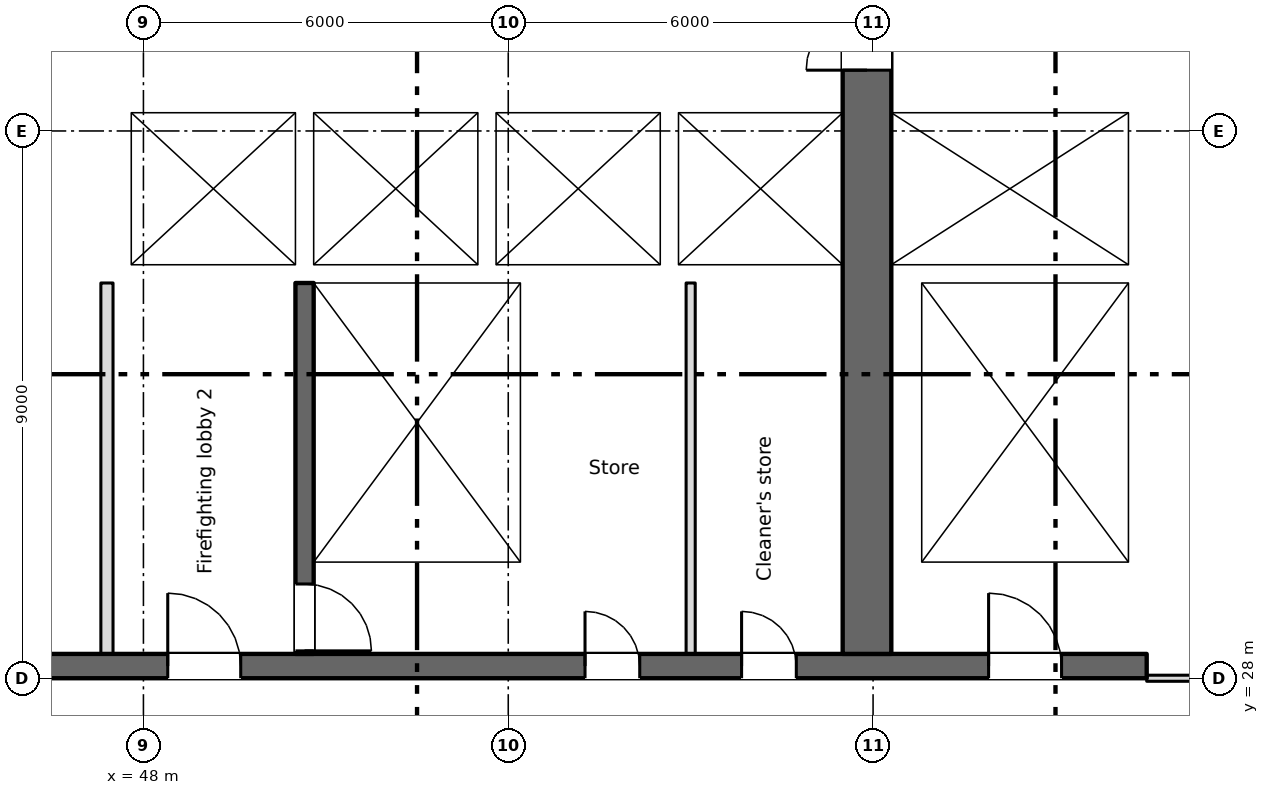
"""IFC4 building model, lengths in metres.
Left out: names, types, materials, properties, quantities, classifications, styles, units other than length and angle.
Written with IfcOpenShell. Run it as: python <this file> out.ifc"""

import sys

from ifc_helpers import new_model, si_unit, direction, frame, frame_2d, origin, place, context, subcontext, project, spatial, rectangle, extrude, element, fill, save


model = new_model("IFC4")
c1 = context("Model", 3, precision=1e-05, world=origin(), true_north=direction((0.0, 1.0)))
c2 = subcontext(c1, "Body", "Model", "MODEL_VIEW")
j1 = project(units=[si_unit("LENGTHUNIT", "METRE"), si_unit("PLANEANGLEUNIT", "RADIAN")], contexts=[c1])
p1 = place(None, origin())
s1 = spatial("IfcSite", under=j1, at=p1, CompositionType="ELEMENT")
p2 = place(p1, origin())
s2 = spatial("IfcBuilding", under=s1, at=p2, CompositionType="ELEMENT")
p3 = place(p2, frame((0.0, 0.0, 98.75)))
s3 = spatial("IfcBuildingStorey", under=s2, at=p3, CompositionType="ELEMENT", Elevation=98.75)
p4 = place(p3, frame((6.7, 28.2, 0.0), z_axis=(0.0, 0.0, 1.0), x_axis=(1.0, 0.0, 0.0)))
e1 = element("IfcWall", 1, at=p4, inside=s3, PredefinedType="SHEAR", context=c2, shape_type="SweptSolid", body=[
    extrude(rectangle(XDim=57.8, YDim=0.4, at=frame_2d((28.9, 0.0))), origin(), (0.0, 0.0, 1.0), 3.35),
])
p5 = place(p4, frame((13.85, 0.0, 0.0)))
e2 = element("IfcOpeningElement", 2, at=p5, cuts=e1, PredefinedType="OPENING", context=c2, shape_type="SweptSolid", body=[
    extrude(rectangle(XDim=0.9, YDim=2.1, at=frame_2d((0.45, 1.05))), frame((0.0, 0.21, 0.0), z_axis=(0.0, -1.0, 0.0), x_axis=(1.0, 0.0, 0.0)), (0.0, 0.0, 1.0), 0.42),
])
p6 = place(p4, frame((48.562, 0.0, 0.0)))
e3 = element("IfcOpeningElement", 3, at=p6, cuts=e1, PredefinedType="OPENING", context=c2, shape_type="SweptSolid", body=[
    extrude(rectangle(XDim=0.9, YDim=2.1, at=frame_2d((0.45, 1.05))), frame((0.0, 0.21, 0.0), z_axis=(0.0, -1.0, 0.0), x_axis=(1.0, 0.0, 0.0)), (0.0, 0.0, 1.0), 0.42),
])
p7 = place(p4, frame((51.137, 0.0, 0.0)))
e4 = element("IfcOpeningElement", 4, at=p7, cuts=e1, PredefinedType="OPENING", context=c2, shape_type="SweptSolid", body=[
    extrude(rectangle(XDim=0.9, YDim=2.1, at=frame_2d((0.45, 1.05))), frame((0.0, 0.21, 0.0), z_axis=(0.0, -1.0, 0.0), x_axis=(1.0, 0.0, 0.0)), (0.0, 0.0, 1.0), 0.42),
])
p8 = place(p4, frame((1.35, 0.0, 0.0)))
e5 = element("IfcOpeningElement", 5, at=p8, cuts=e1, PredefinedType="OPENING", context=c2, shape_type="SweptSolid", body=[
    extrude(rectangle(XDim=0.9, YDim=2.1, at=frame_2d((0.45, 1.05))), frame((0.0, 0.21, 0.0), z_axis=(0.0, -1.0, 0.0), x_axis=(1.0, 0.0, 0.0)), (0.0, 0.0, 1.0), 0.42),
])
p9 = place(p4, frame((4.7, 0.0, 0.0)))
e6 = element("IfcOpeningElement", 6, at=p9, cuts=e1, PredefinedType="OPENING", context=c2, shape_type="SweptSolid", body=[
    extrude(rectangle(XDim=1.2, YDim=2.1, at=frame_2d((0.6, 1.05))), frame((0.0, 0.21, 0.0), z_axis=(0.0, -1.0, 0.0), x_axis=(1.0, 0.0, 0.0)), (0.0, 0.0, 1.0), 0.42),
])
p10 = place(p4, frame((31.7, 0.0, 0.0)))
e7 = element("IfcOpeningElement", 7, at=p10, cuts=e1, PredefinedType="OPENING", context=c2, shape_type="SweptSolid", body=[
    extrude(rectangle(XDim=1.2, YDim=2.1, at=frame_2d((0.6, 1.05))), frame((0.0, 0.21, 0.0), z_axis=(0.0, -1.0, 0.0), x_axis=(1.0, 0.0, 0.0)), (0.0, 0.0, 1.0), 0.42),
])
p11 = place(p4, frame((55.2, 0.0, 0.0)))
e8 = element("IfcOpeningElement", 8, at=p11, cuts=e1, PredefinedType="OPENING", context=c2, shape_type="SweptSolid", body=[
    extrude(rectangle(XDim=1.2, YDim=2.1, at=frame_2d((0.6, 1.05))), frame((0.0, 0.21, 0.0), z_axis=(0.0, -1.0, 0.0), x_axis=(1.0, 0.0, 0.0)), (0.0, 0.0, 1.0), 0.42),
])
p12 = place(p4, frame((21.7, 0.0, 0.0)))
e9 = element("IfcOpeningElement", 9, at=p12, cuts=e1, PredefinedType="OPENING", context=c2, shape_type="SweptSolid", body=[
    extrude(rectangle(XDim=1.2, YDim=2.1, at=frame_2d((0.6, 1.05))), frame((0.0, 0.21, 0.0), z_axis=(0.0, -1.0, 0.0), x_axis=(1.0, 0.0, 0.0)), (0.0, 0.0, 1.0), 0.42),
])
p13 = place(p4, frame((41.7, 0.0, 0.0)))
e10 = element("IfcOpeningElement", 10, at=p13, cuts=e1, PredefinedType="OPENING", context=c2, shape_type="SweptSolid", body=[
    extrude(rectangle(XDim=1.2, YDim=2.1, at=frame_2d((0.6, 1.05))), frame((0.0, 0.21, 0.0), z_axis=(0.0, -1.0, 0.0), x_axis=(1.0, 0.0, 0.0)), (0.0, 0.0, 1.0), 0.42),
])
p14 = place(p4, frame((24.85, 0.0, 0.0)))
e11 = element("IfcOpeningElement", 11, at=p14, cuts=e1, PredefinedType="OPENING", context=c2, shape_type="SweptSolid", body=[
    extrude(rectangle(XDim=2.4, YDim=2.1, at=frame_2d((1.2, 1.05))), frame((0.0, 0.21, 0.0), z_axis=(0.0, -1.0, 0.0), x_axis=(1.0, 0.0, 0.0)), (0.0, 0.0, 1.0), 0.42),
])
p15 = place(p4, frame((37.35, 0.0, 0.0)))
e12 = element("IfcOpeningElement", 12, at=p15, cuts=e1, PredefinedType="OPENING", context=c2, shape_type="SweptSolid", body=[
    extrude(rectangle(XDim=2.4, YDim=2.1, at=frame_2d((1.2, 1.05))), frame((0.0, 0.21, 0.0), z_axis=(0.0, -1.0, 0.0), x_axis=(1.0, 0.0, 0.0)), (0.0, 0.0, 1.0), 0.42),
])
p16 = place(p4, frame((7.95, 0.0, 0.0)))
e13 = element("IfcOpeningElement", 13, at=p16, cuts=e1, PredefinedType="OPENING", context=c2, shape_type="SweptSolid", body=[
    extrude(rectangle(XDim=2.4, YDim=2.1, at=frame_2d((1.2, 1.05))), frame((0.0, 0.21, 0.0), z_axis=(0.0, -1.0, 0.0), x_axis=(1.0, 0.0, 0.0)), (0.0, 0.0, 1.0), 0.42),
])
p17 = place(p4, frame((28.85, 0.0, 0.0)))
e14 = element("IfcOpeningElement", 14, at=p17, cuts=e1, PredefinedType="OPENING", context=c2, shape_type="SweptSolid", body=[
    extrude(rectangle(XDim=0.9, YDim=2.1, at=frame_2d((0.45, 1.05))), frame((0.0, 0.21, 0.0), z_axis=(0.0, -1.0, 0.0), x_axis=(1.0, 0.0, 0.0)), (0.0, 0.0, 1.0), 0.42),
])
p18 = place(p4, frame((34.85, 0.0, 0.0)))
e15 = element("IfcOpeningElement", 15, at=p18, cuts=e1, PredefinedType="OPENING", context=c2, shape_type="SweptSolid", body=[
    extrude(rectangle(XDim=0.9, YDim=2.1, at=frame_2d((0.45, 1.05))), frame((0.0, 0.21, 0.0), z_axis=(0.0, -1.0, 0.0), x_axis=(1.0, 0.0, 0.0)), (0.0, 0.0, 1.0), 0.42),
])
p19 = place(p3, frame((64.35, 34.8, 0.0), z_axis=(0.0, 0.0, 1.0), x_axis=(0.0, 1.0, 0.0)))
e16 = element("IfcWall", 16, at=p19, inside=s3, PredefinedType="SHEAR", context=c2, shape_type="SweptSolid", body=[
    extrude(rectangle(XDim=10.4, YDim=0.3, at=frame_2d((5.2, 0.0))), origin(), (0.0, 0.0, 1.0), 3.35),
])
p20 = place(p3, frame((59.9, 28.4, 0.0), z_axis=(0.0, 0.0, 1.0), x_axis=(0.0, 1.0, 0.0)))
e17 = element("IfcWall", 17, at=p20, inside=s3, PredefinedType="SHEAR", context=c2, shape_type="SweptSolid", body=[
    extrude(rectangle(XDim=16.8, YDim=0.8, at=frame_2d((8.4, 0.0))), origin(), (0.0, 0.0, 1.0), 3.35),
])
p21 = place(p20, frame((9.6, 0.0, 0.0)))
e18 = element("IfcOpeningElement", 18, at=p21, cuts=e17, PredefinedType="OPENING", context=c2, shape_type="SweptSolid", body=[
    extrude(rectangle(XDim=2.0, YDim=2.1, at=frame_2d((1.0, 1.05))), frame((0.0, 0.41, 0.0), z_axis=(0.0, -1.0, 0.0), x_axis=(1.0, 0.0, 0.0)), (0.0, 0.0, 1.0), 0.82),
])
p22 = place(p20, frame((15.35, 0.0, 0.0)))
e19 = element("IfcOpeningElement", 19, at=p22, cuts=e17, PredefinedType="OPENING", context=c2, shape_type="SweptSolid", body=[
    extrude(rectangle(XDim=1.2, YDim=2.1, at=frame_2d((0.6, 1.05))), frame((0.0, 0.41, 0.0), z_axis=(0.0, -1.0, 0.0), x_axis=(1.0, 0.0, 0.0)), (0.0, 0.0, 1.0), 0.82),
])
p23 = place(p3, frame((50.65, 34.5, 0.0), z_axis=(0.0, 0.0, 1.0), x_axis=(0.0, -1.0, 0.0)))
e20 = element("IfcWall", 20, at=p23, inside=s3, PredefinedType="SHEAR", context=c2, shape_type="SweptSolid", body=[
    extrude(rectangle(XDim=6.1, YDim=0.3, at=frame_2d((3.05, 0.0))), origin(), (0.0, 0.0, 1.0), 3.35),
])
p24 = place(p23, frame((4.95, 0.0, 0.0)))
e21 = element("IfcOpeningElement", 21, at=p24, cuts=e20, PredefinedType="OPENING", context=c2, shape_type="SweptSolid", body=[
    extrude(rectangle(XDim=1.1, YDim=2.1, at=frame_2d((0.55, 1.05))), frame((0.0, 0.16, 0.0), z_axis=(0.0, -1.0, 0.0), x_axis=(1.0, 0.0, 0.0)), (0.0, 0.0, 1.0), 0.32),
])
p25 = place(p3, frame((54.35, 28.4, 0.0), z_axis=(0.0, 0.0, 1.0), x_axis=(0.0, 1.0, 0.0)))
e22 = element("IfcWall", 22, at=p25, inside=s3, PredefinedType="SHEAR", context=c2, shape_type="SweptSolid", body=[
    extrude(rectangle(XDim=6.1, YDim=0.3, at=frame_2d((3.05, 0.0))), origin(), (0.0, 0.0, 1.0), 3.35),
])
p26 = place(p3, frame((60.55, 28.4, 0.0), z_axis=(0.0, 0.0, 1.0), x_axis=(0.0, 1.0, 0.0)))
e23 = element("IfcWall", 23, at=p26, inside=s3, PredefinedType="SHEAR", context=c2, shape_type="SweptSolid", body=[
    extrude(rectangle(XDim=6.1, YDim=0.5, at=frame_2d((3.05, 0.0))), origin(), (0.0, 0.0, 1.0), 3.35),
])
p27 = place(p3, frame((64.35, 28.4, 0.0), z_axis=(0.0, 0.0, 1.0), x_axis=(0.0, 1.0, 0.0)))
e24 = element("IfcWall", 24, at=p27, inside=s3, PredefinedType="SHEAR", context=c2, shape_type="SweptSolid", body=[
    extrude(rectangle(XDim=6.1, YDim=0.3, at=frame_2d((3.05, 0.0))), origin(), (0.0, 0.0, 1.0), 3.35),
])
p28 = place(p3, frame((47.3, 34.65, 0.0), z_axis=(0.0, 0.0, 1.0), x_axis=(1.0, 0.0, 0.0)))
e25 = element("IfcWall", 25, at=p28, inside=s3, PredefinedType="SHEAR", context=c2, shape_type="SweptSolid", body=[
    extrude(rectangle(XDim=12.2, YDim=0.3, at=frame_2d((6.1, 0.0))), origin(), (0.0, 0.0, 1.0), 3.35),
])
p29 = place(p28, frame((1.3, 0.0, 0.0)))
e26 = element("IfcOpeningElement", 26, at=p29, cuts=e25, PredefinedType="OPENING", context=c2, shape_type="SweptSolid", body=[
    extrude(rectangle(XDim=1.1, YDim=2.1, at=frame_2d((0.55, 1.05))), frame((0.0, 0.16, 0.0), z_axis=(0.0, -1.0, 0.0), x_axis=(1.0, 0.0, 0.0)), (0.0, 0.0, 1.0), 0.32),
])
p30 = place(p3, frame((60.3, 34.65, 0.0), z_axis=(0.0, 0.0, 1.0), x_axis=(1.0, 0.0, 0.0)))
e27 = element("IfcWall", 27, at=p30, inside=s3, PredefinedType="SHEAR", context=c2, shape_type="SweptSolid", body=[
    extrude(rectangle(XDim=4.2, YDim=0.3, at=frame_2d((2.1, 0.0))), origin(), (0.0, 0.0, 1.0), 3.35),
])
p31 = place(p3, frame((47.3, 37.45, 0.0), z_axis=(0.0, 0.0, 1.0), x_axis=(1.0, 0.0, 0.0)))
e28 = element("IfcWall", 28, at=p31, inside=s3, PredefinedType="SHEAR", context=c2, shape_type="SweptSolid", body=[
    extrude(rectangle(XDim=12.2, YDim=0.3, at=frame_2d((6.1, 0.0))), origin(), (0.0, 0.0, 1.0), 3.35),
])
p32 = place(p31, frame((4.3, 0.0, 0.0)))
e29 = element("IfcOpeningElement", 29, at=p32, cuts=e28, PredefinedType="OPENING", context=c2, shape_type="SweptSolid", body=[
    extrude(rectangle(XDim=1.1, YDim=2.1, at=frame_2d((0.55, 1.05))), frame((0.0, 0.16, 0.0), z_axis=(0.0, -1.0, 0.0), x_axis=(1.0, 0.0, 0.0)), (0.0, 0.0, 1.0), 0.32),
])
p33 = place(p31, frame((7.3, 0.0, 0.0)))
e30 = element("IfcOpeningElement", 30, at=p33, cuts=e28, PredefinedType="OPENING", context=c2, shape_type="SweptSolid", body=[
    extrude(rectangle(XDim=1.1, YDim=2.1, at=frame_2d((0.55, 1.05))), frame((0.0, 0.16, 0.0), z_axis=(0.0, -1.0, 0.0), x_axis=(1.0, 0.0, 0.0)), (0.0, 0.0, 1.0), 0.32),
])
p34 = place(p31, frame((10.3, 0.0, 0.0)))
e31 = element("IfcOpeningElement", 31, at=p34, cuts=e28, PredefinedType="OPENING", context=c2, shape_type="SweptSolid", body=[
    extrude(rectangle(XDim=1.1, YDim=2.1, at=frame_2d((0.55, 1.05))), frame((0.0, 0.16, 0.0), z_axis=(0.0, -1.0, 0.0), x_axis=(1.0, 0.0, 0.0)), (0.0, 0.0, 1.0), 0.32),
])
p35 = place(p3, frame((60.3, 37.45, 0.0), z_axis=(0.0, 0.0, 1.0), x_axis=(1.0, 0.0, 0.0)))
e32 = element("IfcWall", 32, at=p35, inside=s3, PredefinedType="SHEAR", context=c2, shape_type="SweptSolid", body=[
    extrude(rectangle(XDim=3.9, YDim=0.3, at=frame_2d((1.95, 0.0))), origin(), (0.0, 0.0, 1.0), 3.35),
])
p36 = place(p35, frame((1.4, 0.0, 0.0)))
e33 = element("IfcOpeningElement", 33, at=p36, cuts=e32, PredefinedType="OPENING", context=c2, shape_type="SweptSolid", body=[
    extrude(rectangle(XDim=1.1, YDim=2.1, at=frame_2d((0.55, 1.05))), frame((0.0, 0.16, 0.0), z_axis=(0.0, -1.0, 0.0), x_axis=(1.0, 0.0, 0.0)), (0.0, 0.0, 1.0), 0.32),
])
p37 = place(p3, frame((47.55, 34.8, 0.0), z_axis=(0.0, 0.0, 1.0), x_axis=(0.0, 1.0, 0.0)))
e34 = element("IfcWall", 34, at=p37, inside=s3, PredefinedType="SHEAR", context=c2, shape_type="SweptSolid", body=[
    extrude(rectangle(XDim=2.5, YDim=0.5, at=frame_2d((1.25, 0.0))), origin(), (0.0, 0.0, 1.0), 3.35),
])
for number, where, z_axis, x_axis in (
    (35, (50.65, 34.8, 0.0), (0.0, 0.0, 1.0), (0.0, 1.0, 0.0)),
    (36, (53.65, 34.8, 0.0), (0.0, 0.0, 1.0), (0.0, 1.0, 0.0)),
    (37, (56.65, 34.8, 0.0), (0.0, 0.0, 1.0), (0.0, 1.0, 0.0)),
):
    element("IfcWall", number, at=place(p3, frame(where, z_axis=z_axis, x_axis=x_axis)), inside=s3, PredefinedType="SHEAR", context=c2, shape_type="SweptSolid", body=[
        extrude(rectangle(XDim=2.5, YDim=0.3, at=frame_2d((1.25, 0.0))), origin(), (0.0, 0.0, 1.0), 3.35),
    ])
p38 = place(p3, frame((47.4, 28.4, 0.0), z_axis=(0.0, 0.0, 1.0), x_axis=(0.0, 1.0, 0.0)))
e38 = element("IfcWall", 38, at=p38, inside=s3, PredefinedType="PARTITIONING", context=c2, shape_type="SweptSolid", body=[
    extrude(rectangle(XDim=6.1, YDim=0.2, at=frame_2d((3.05, 0.0))), origin(), (0.0, 0.0, 1.0), 3.35),
])
p39 = place(p3, frame((57.0, 28.4, 0.0), z_axis=(0.0, 0.0, 1.0), x_axis=(0.0, 1.0, 0.0)))
e39 = element("IfcWall", 39, at=p39, inside=s3, PredefinedType="PARTITIONING", context=c2, shape_type="SweptSolid", body=[
    extrude(rectangle(XDim=6.1, YDim=0.15, at=frame_2d((3.05, 0.0))), origin(), (0.0, 0.0, 1.0), 3.35),
])
p40 = place(p3, frame((64.5, 28.0, 0.0), z_axis=(0.0, 0.0, 1.0), x_axis=(1.0, 0.0, 0.0)))
e40 = element("IfcWall", 40, at=p40, inside=s3, PredefinedType="PARTITIONING", context=c2, shape_type="SweptSolid", body=[
    extrude(rectangle(XDim=6.8, YDim=0.1, at=frame_2d((3.4, 0.0))), origin(), (0.0, 0.0, 1.0), 3.35),
])
p41 = place(p40, frame((2.5, 0.0, 0.0)))
e41 = element("IfcOpeningElement", 41, at=p41, cuts=e40, PredefinedType="OPENING", context=c2, shape_type="SweptSolid", body=[
    extrude(rectangle(XDim=1.8, YDim=2.1, at=frame_2d((0.9, 1.05))), frame((0.0, 0.06, 0.0), z_axis=(0.0, -1.0, 0.0), x_axis=(1.0, 0.0, 0.0)), (0.0, 0.0, 1.0), 0.12),
])
p42 = place(p6, origin())
e42 = element("IfcDoor", 42, at=p42, inside=s3, OperationType="SINGLE_SWING_LEFT", PredefinedType="DOOR", context=c2, shape_type="SweptSolid", body=[
    extrude(rectangle(XDim=0.9, YDim=2.1, at=frame_2d((0.45, 1.05))), frame((0.0, 0.025, 0.0), z_axis=(0.0, -1.0, 0.0), x_axis=(1.0, 0.0, 0.0)), (0.0, 0.0, 1.0), 0.05),
])
fill(e3, e42)
p43 = place(p7, origin())
e43 = element("IfcDoor", 43, at=p43, inside=s3, OperationType="SINGLE_SWING_LEFT", PredefinedType="DOOR", context=c2, shape_type="SweptSolid", body=[
    extrude(rectangle(XDim=0.9, YDim=2.1, at=frame_2d((0.45, 1.05))), frame((0.0, 0.025, 0.0), z_axis=(0.0, -1.0, 0.0), x_axis=(1.0, 0.0, 0.0)), (0.0, 0.0, 1.0), 0.05),
])
fill(e4, e43)
p44 = place(p32, origin())
e44 = element("IfcDoor", 44, at=p44, inside=s3, OperationType="SLIDING_TO_LEFT", PredefinedType="DOOR", context=c2, shape_type="SweptSolid", body=[
    extrude(rectangle(XDim=1.1, YDim=2.1, at=frame_2d((0.55, 1.05))), frame((0.0, 0.025, 0.0), z_axis=(0.0, -1.0, 0.0), x_axis=(1.0, 0.0, 0.0)), (0.0, 0.0, 1.0), 0.05),
])
fill(e29, e44)
p45 = place(p33, origin())
e45 = element("IfcDoor", 45, at=p45, inside=s3, OperationType="SLIDING_TO_LEFT", PredefinedType="DOOR", context=c2, shape_type="SweptSolid", body=[
    extrude(rectangle(XDim=1.1, YDim=2.1, at=frame_2d((0.55, 1.05))), frame((0.0, 0.025, 0.0), z_axis=(0.0, -1.0, 0.0), x_axis=(1.0, 0.0, 0.0)), (0.0, 0.0, 1.0), 0.05),
])
fill(e30, e45)
p46 = place(p34, origin())
e46 = element("IfcDoor", 46, at=p46, inside=s3, OperationType="SLIDING_TO_LEFT", PredefinedType="DOOR", context=c2, shape_type="SweptSolid", body=[
    extrude(rectangle(XDim=1.1, YDim=2.1, at=frame_2d((0.55, 1.05))), frame((0.0, 0.025, 0.0), z_axis=(0.0, -1.0, 0.0), x_axis=(1.0, 0.0, 0.0)), (0.0, 0.0, 1.0), 0.05),
])
fill(e31, e46)
p47 = place(p36, origin())
e47 = element("IfcDoor", 47, at=p47, inside=s3, OperationType="SLIDING_TO_LEFT", PredefinedType="DOOR", context=c2, shape_type="SweptSolid", body=[
    extrude(rectangle(XDim=1.1, YDim=2.1, at=frame_2d((0.55, 1.05))), frame((0.0, 0.025, 0.0), z_axis=(0.0, -1.0, 0.0), x_axis=(1.0, 0.0, 0.0)), (0.0, 0.0, 1.0), 0.05),
])
fill(e33, e47)
p48 = place(p29, origin())
e48 = element("IfcDoor", 48, at=p48, inside=s3, OperationType="SLIDING_TO_LEFT", PredefinedType="DOOR", context=c2, shape_type="SweptSolid", body=[
    extrude(rectangle(XDim=1.1, YDim=2.1, at=frame_2d((0.55, 1.05))), frame((0.0, 0.025, 0.0), z_axis=(0.0, -1.0, 0.0), x_axis=(1.0, 0.0, 0.0)), (0.0, 0.0, 1.0), 0.05),
])
fill(e26, e48)
p49 = place(p24, origin())
e49 = element("IfcDoor", 49, at=p49, inside=s3, OperationType="SINGLE_SWING_RIGHT", PredefinedType="DOOR", context=c2, shape_type="SweptSolid", body=[
    extrude(rectangle(XDim=1.1, YDim=2.1, at=frame_2d((0.55, 1.05))), frame((0.0, 0.025, 0.0), z_axis=(0.0, -1.0, 0.0), x_axis=(1.0, 0.0, 0.0)), (0.0, 0.0, 1.0), 0.05),
])
fill(e21, e49)
p50 = place(p11, origin())
e50 = element("IfcDoor", 50, at=p50, inside=s3, OperationType="SINGLE_SWING_LEFT", PredefinedType="DOOR", context=c2, shape_type="SweptSolid", body=[
    extrude(rectangle(XDim=1.2, YDim=2.1, at=frame_2d((0.6, 1.05))), frame((0.0, 0.025, 0.0), z_axis=(0.0, -1.0, 0.0), x_axis=(1.0, 0.0, 0.0)), (0.0, 0.0, 1.0), 0.05),
])
fill(e8, e50)
p51 = place(p13, origin())
e51 = element("IfcDoor", 51, at=p51, inside=s3, OperationType="SINGLE_SWING_LEFT", PredefinedType="DOOR", context=c2, shape_type="SweptSolid", body=[
    extrude(rectangle(XDim=1.2, YDim=2.1, at=frame_2d((0.6, 1.05))), frame((0.0, 0.025, 0.0), z_axis=(0.0, -1.0, 0.0), x_axis=(1.0, 0.0, 0.0)), (0.0, 0.0, 1.0), 0.05),
])
fill(e10, e51)
p52 = place(p21, origin())
e52 = element("IfcDoor", 52, at=p52, inside=s3, OperationType="DOUBLE_DOOR_SINGLE_SWING", PredefinedType="DOOR", context=c2, shape_type="SweptSolid", body=[
    extrude(rectangle(XDim=2.0, YDim=2.1, at=frame_2d((1.0, 1.05))), frame((0.0, 0.025, 0.0), z_axis=(0.0, -1.0, 0.0), x_axis=(1.0, 0.0, 0.0)), (0.0, 0.0, 1.0), 0.05),
])
fill(e18, e52)
save(model, sys.argv[1])
